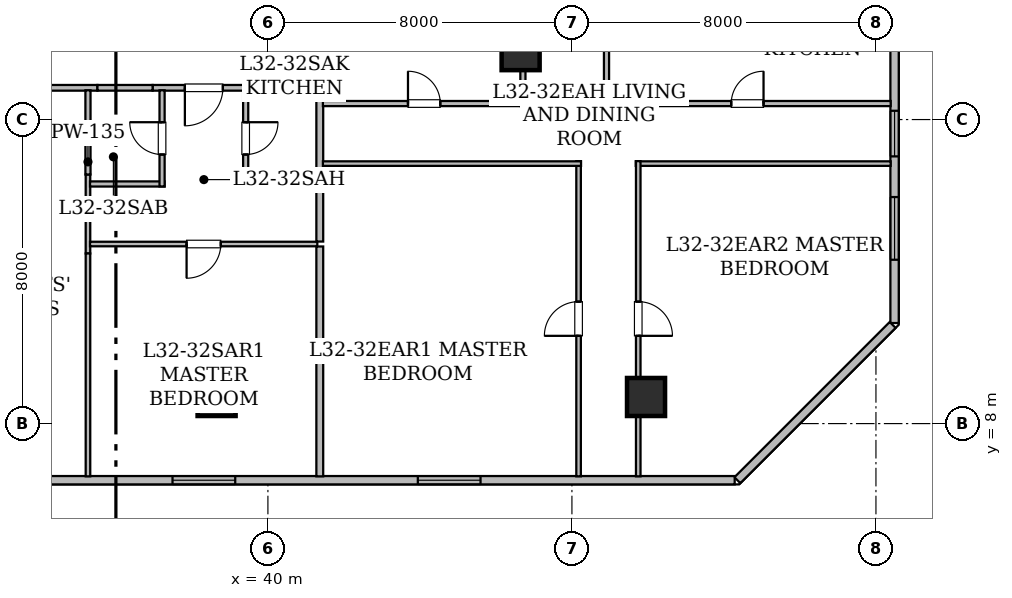
"""IFC4 building model, lengths in metres.
Left out: names, types, materials, properties, quantities, classifications, styles, units other than length and angle.
Written with IfcOpenShell. Run it as: python <this file> out.ifc"""

import sys

from ifc_helpers import new_model, si_unit, direction, frame, frame_2d, origin, origin_2d, place, context, subcontext, project, spatial, rectangle, hollow_rectangle, extrude, element, fill, save


model = new_model("IFC4")
c1 = context("Model", 3, precision=1e-05, world=origin(), true_north=direction((0.0, 1.0)))
c2 = subcontext(c1, "Body", "Model", "MODEL_VIEW")
j1 = project(units=[si_unit("LENGTHUNIT", "METRE"), si_unit("PLANEANGLEUNIT", "RADIAN")], contexts=[c1])
p1 = place(None, origin())
s1 = spatial("IfcSite", under=j1, at=p1, CompositionType="ELEMENT")
p2 = place(p1, origin())
s2 = spatial("IfcBuilding", under=s1, at=p2, CompositionType="ELEMENT")
p3 = place(p2, frame((0.0, 0.0, 127.45)))
s3 = spatial("IfcBuildingStorey", under=s2, at=p3, CompositionType="ELEMENT", Elevation=127.45)
for number, where, z_axis, x_axis in (
    (1, (38.65, 8.7, 0.0), (0.0, 0.0, 1.0), (1.0, 0.0, 0.0)),
    (2, (49.95, 8.7, 0.0), (0.0, 0.0, 1.0), (1.0, 0.0, 0.0)),
    (3, (46.65, 17.8, 0.0), (0.0, 0.0, 1.0), (1.0, 0.0, 0.0)),
):
    element("IfcColumn", number, at=place(p3, frame(where, z_axis=z_axis, x_axis=x_axis)), inside=s3, PredefinedType="COLUMN", context=c2, shape_type="SweptSolid", body=[
        extrude(hollow_rectangle(XDim=1.0, YDim=1.0, WallThickness=0.05, at=origin_2d()), origin(), (0.0, 0.0, 1.0), 3.65),
    ])
p4 = place(p3, frame((56.49, 24.707, 0.0), z_axis=(0.0, 0.0, 1.0), x_axis=(0.0, -1.0, 0.0)))
e4 = element("IfcWall", 4, at=p4, inside=s3, PredefinedType="STANDARD", context=c2, shape_type="SweptSolid", body=[
    extrude(rectangle(XDim=14.061, YDim=0.22, at=frame_2d((7.031, 0.0))), origin(), (0.0, 0.0, 1.0), 3.43),
])
p5 = place(p4, frame((8.476, 0.0, 0.8)))
e5 = element("IfcOpeningElement", 5, at=p5, cuts=e4, PredefinedType="OPENING", context=c2, shape_type="SweptSolid", body=[
    extrude(rectangle(XDim=1.2, YDim=1.5, at=frame_2d((0.6, 0.75))), frame((0.0, 0.12, 0.0), z_axis=(0.0, -1.0, 0.0), x_axis=(1.0, 0.0, 0.0)), (0.0, 0.0, 1.0), 0.24),
])
p6 = place(p4, frame((10.746, 0.0, 0.85)))
e6 = element("IfcOpeningElement", 6, at=p6, cuts=e4, PredefinedType="OPENING", context=c2, shape_type="SweptSolid", body=[
    extrude(rectangle(XDim=1.65, YDim=1.55, at=frame_2d((0.825, 0.775))), frame((0.0, 0.12, 0.0), z_axis=(0.0, -1.0, 0.0), x_axis=(1.0, 0.0, 0.0)), (0.0, 0.0, 1.0), 0.24),
])
p7 = place(p3, frame((56.44, 10.596, 0.0), z_axis=(0.0, 0.0, 1.0), x_axis=(-0.707106781187, -0.707106781187, 0.0)))
e7 = element("IfcWall", 7, at=p7, inside=s3, PredefinedType="STANDARD", context=c2, shape_type="SweptSolid", body=[
    extrude(rectangle(XDim=5.778, YDim=0.22, at=frame_2d((2.889, 0.0))), origin(), (0.0, 0.0, 1.0), 3.43),
])
p8 = place(p3, frame((52.283, 6.51, 0.0), z_axis=(0.0, 0.0, 1.0), x_axis=(-1.0, 0.0, 0.0)))
e8 = element("IfcWall", 8, at=p8, inside=s3, PredefinedType="STANDARD", context=c2, shape_type="SweptSolid", body=[
    extrude(rectangle(XDim=38.568, YDim=0.22, at=frame_2d((19.284, 0.0))), origin(), (0.0, 0.0, 1.0), 3.43),
])
p9 = place(p8, frame((20.408, 0.0, 0.85)))
e9 = element("IfcOpeningElement", 9, at=p9, cuts=e8, PredefinedType="OPENING", context=c2, shape_type="SweptSolid", body=[
    extrude(rectangle(XDim=1.65, YDim=1.55, at=frame_2d((0.825, 0.775))), frame((0.0, 0.12, 0.0), z_axis=(0.0, -1.0, 0.0), x_axis=(1.0, 0.0, 0.0)), (0.0, 0.0, 1.0), 0.24),
])
p10 = place(p8, frame((35.483, 0.0, 0.85)))
e10 = element("IfcOpeningElement", 10, at=p10, cuts=e8, PredefinedType="OPENING", context=c2, shape_type="SweptSolid", body=[
    extrude(rectangle(XDim=1.65, YDim=1.55, at=frame_2d((0.825, 0.775))), frame((0.0, 0.12, 0.0), z_axis=(0.0, -1.0, 0.0), x_axis=(1.0, 0.0, 0.0)), (0.0, 0.0, 1.0), 0.24),
])
p11 = place(p8, frame((25.888, 0.0, 0.85)))
e11 = element("IfcOpeningElement", 11, at=p11, cuts=e8, PredefinedType="OPENING", context=c2, shape_type="SweptSolid", body=[
    extrude(rectangle(XDim=1.65, YDim=1.55, at=frame_2d((0.825, 0.775))), frame((0.0, 0.12, 0.0), z_axis=(0.0, -1.0, 0.0), x_axis=(1.0, 0.0, 0.0)), (0.0, 0.0, 1.0), 0.24),
])
p12 = place(p8, frame((28.168, 0.0, 0.8)))
e12 = element("IfcOpeningElement", 12, at=p12, cuts=e8, PredefinedType="OPENING", context=c2, shape_type="SweptSolid", body=[
    extrude(rectangle(XDim=1.2, YDim=1.5, at=frame_2d((0.6, 0.75))), frame((0.0, 0.12, 0.0), z_axis=(0.0, -1.0, 0.0), x_axis=(1.0, 0.0, 0.0)), (0.0, 0.0, 1.0), 0.24),
])
p13 = place(p8, frame((31.371, 0.0, 0.85)))
e13 = element("IfcOpeningElement", 13, at=p13, cuts=e8, PredefinedType="OPENING", context=c2, shape_type="SweptSolid", body=[
    extrude(rectangle(XDim=1.65, YDim=1.55, at=frame_2d((0.825, 0.775))), frame((0.0, 0.12, 0.0), z_axis=(0.0, -1.0, 0.0), x_axis=(1.0, 0.0, 0.0)), (0.0, 0.0, 1.0), 0.24),
])
p14 = place(p8, frame((13.143, 0.0, 0.85)))
e14 = element("IfcOpeningElement", 14, at=p14, cuts=e8, PredefinedType="OPENING", context=c2, shape_type="SweptSolid", body=[
    extrude(rectangle(XDim=1.65, YDim=1.55, at=frame_2d((0.825, 0.775))), frame((0.0, 0.12, 0.0), z_axis=(0.0, -1.0, 0.0), x_axis=(1.0, 0.0, 0.0)), (0.0, 0.0, 1.0), 0.24),
])
p15 = place(p8, frame((6.688, 0.0, 0.85)))
e15 = element("IfcOpeningElement", 15, at=p15, cuts=e8, PredefinedType="OPENING", context=c2, shape_type="SweptSolid", body=[
    extrude(rectangle(XDim=1.65, YDim=1.55, at=frame_2d((0.825, 0.775))), frame((0.0, 0.12, 0.0), z_axis=(0.0, -1.0, 0.0), x_axis=(1.0, 0.0, 0.0)), (0.0, 0.0, 1.0), 0.24),
])
p16 = place(p3, frame((35.514, 16.835, 0.0), z_axis=(0.0, 0.0, 1.0), x_axis=(-1.0, 0.0, 0.0)))
e16 = element("IfcWall", 16, at=p16, inside=s3, PredefinedType="STANDARD", context=c2, shape_type="SweptSolid", body=[
    extrude(rectangle(XDim=8.614, YDim=0.15, at=frame_2d((4.307, 0.0))), origin(), (0.0, 0.0, 1.0), 2.647),
])
p17 = place(p16, frame((3.753, 0.0, 0.0)))
e17 = element("IfcOpeningElement", 17, at=p17, cuts=e16, PredefinedType="OPENING", context=c2, shape_type="SweptSolid", body=[
    extrude(rectangle(XDim=1.15, YDim=2.2, at=frame_2d((0.575, 1.1))), frame((0.0, 0.085, 0.0), z_axis=(0.0, -1.0, 0.0), x_axis=(1.0, 0.0, 0.0)), (0.0, 0.0, 1.0), 0.17),
])
p18 = place(p3, frame((39.664, 16.835, 0.0), z_axis=(0.0, 0.0, 1.0), x_axis=(-1.0, 0.0, 0.0)))
e18 = element("IfcWall", 18, at=p18, inside=s3, PredefinedType="STANDARD", context=c2, shape_type="SweptSolid", body=[
    extrude(rectangle(XDim=2.698, YDim=0.15, at=frame_2d((1.349, 0.0))), origin(), (0.0, 0.0, 1.0), 2.647),
])
p19 = place(p18, frame((0.849, 0.0, 0.0)))
e19 = element("IfcOpeningElement", 19, at=p19, cuts=e18, PredefinedType="OPENING", context=c2, shape_type="SweptSolid", body=[
    extrude(rectangle(XDim=1.0, YDim=2.15, at=frame_2d((0.5, 1.075))), frame((0.0, 0.085, 0.0), z_axis=(0.0, -1.0, 0.0), x_axis=(1.0, 0.0, 0.0)), (0.0, 0.0, 1.0), 0.17),
])
p20 = place(p3, frame((36.966, 16.835, 0.0), z_axis=(0.0, 0.0, 1.0), x_axis=(-1.0, 0.0, 0.0)))
e20 = element("IfcWall", 20, at=p20, inside=s3, PredefinedType="STANDARD", context=c2, shape_type="SweptSolid", body=[
    extrude(rectangle(XDim=1.452, YDim=0.15, at=frame_2d((0.726, 0.0))), origin(), (0.0, 0.0, 1.0), 3.43),
])
p21 = place(p3, frame((41.3, 16.835, 0.0), z_axis=(0.0, 0.0, 1.0), x_axis=(-1.0, 0.0, 0.0)))
e21 = element("IfcWall", 21, at=p21, inside=s3, PredefinedType="STANDARD", context=c2, shape_type="SweptSolid", body=[
    extrude(rectangle(XDim=1.636, YDim=0.15, at=frame_2d((0.818, 0.0))), origin(), (0.0, 0.0, 1.0), 3.43),
])
p22 = place(p3, frame((41.365, 20.05, 0.0), z_axis=(0.0, 0.0, 1.0), x_axis=(0.0, -1.0, 0.0)))
e22 = element("IfcWall", 22, at=p22, inside=s3, PredefinedType="STANDARD", context=c2, shape_type="SweptSolid", body=[
    extrude(rectangle(XDim=3.15, YDim=0.15, at=frame_2d((1.575, 0.0))), origin(), (0.0, 0.0, 1.0), 2.647),
])
p23 = place(p3, frame((35.265, 14.554, 0.0), z_axis=(0.0, 0.0, 1.0), x_axis=(0.0, -1.0, 0.0)))
e23 = element("IfcWall", 23, at=p23, inside=s3, PredefinedType="PARTITIONING", context=c2, shape_type="SweptSolid", body=[
    extrude(rectangle(XDim=2.078, YDim=0.12, at=frame_2d((1.039, 0.0))), origin(), (0.0, 0.0, 1.0), 3.43),
])
p24 = place(p3, frame((35.265, 16.77, 0.0), z_axis=(0.0, 0.0, 1.0), x_axis=(0.0, -1.0, 0.0)))
e24 = element("IfcWall", 24, at=p24, inside=s3, PredefinedType="PARTITIONING", context=c2, shape_type="SweptSolid", body=[
    extrude(rectangle(XDim=2.216, YDim=0.135, at=frame_2d((1.108, 0.0))), origin(), (0.0, 0.0, 1.0), 3.43),
])
p25 = place(p3, frame((35.265, 12.476, 0.0), z_axis=(0.0, 0.0, 1.0), x_axis=(0.0, -1.0, 0.0)))
e25 = element("IfcWall", 25, at=p25, inside=s3, PredefinedType="PARTITIONING", context=c2, shape_type="SweptSolid", body=[
    extrude(rectangle(XDim=5.864, YDim=0.12, at=frame_2d((2.932, 0.0))), origin(), (0.0, 0.0, 1.0), 2.876),
])
p26 = place(p3, frame((35.319, 14.305, 0.0), z_axis=(0.0, 0.0, 1.0), x_axis=(1.0, 0.0, 0.0)))
e26 = element("IfcWall", 26, at=p26, inside=s3, PredefinedType="PARTITIONING", context=c2, shape_type="SweptSolid", body=[
    extrude(rectangle(XDim=1.961, YDim=0.135, at=frame_2d((0.98, 0.0))), origin(), (0.0, 0.0, 1.0), 3.43),
])
p27 = place(p3, frame((37.215, 14.24, 0.0), z_axis=(0.0, 0.0, 1.0), x_axis=(0.0, 1.0, 0.0)))
e27 = element("IfcWall", 27, at=p27, inside=s3, PredefinedType="PARTITIONING", context=c2, shape_type="SweptSolid", body=[
    extrude(rectangle(XDim=2.53, YDim=0.135, at=frame_2d((1.265, 0.0))), origin(), (0.0, 0.0, 1.0), 3.43),
])
p28 = place(p27, frame((0.84, 0.0, 0.0)))
e28 = element("IfcOpeningElement", 28, at=p28, cuts=e27, PredefinedType="OPENING", context=c2, shape_type="SweptSolid", body=[
    extrude(rectangle(XDim=0.85, YDim=2.1, at=frame_2d((0.425, 1.05))), frame((0.0, 0.077, 0.0), z_axis=(0.0, -1.0, 0.0), x_axis=(1.0, 0.0, 0.0)), (0.0, 0.0, 1.0), 0.155),
])
p29 = place(p3, frame((39.415, 16.77, 0.0), z_axis=(0.0, 0.0, 1.0), x_axis=(0.0, -1.0, 0.0)))
e29 = element("IfcWall", 29, at=p29, inside=s3, PredefinedType="PARTITIONING", context=c2, shape_type="SweptSolid", body=[
    extrude(rectangle(XDim=2.53, YDim=0.135, at=frame_2d((1.265, 0.0))), origin(), (0.0, 0.0, 1.0), 2.647),
])
p30 = place(p29, frame((0.84, 0.0, 0.0)))
e30 = element("IfcOpeningElement", 30, at=p30, cuts=e29, PredefinedType="OPENING", context=c2, shape_type="SweptSolid", body=[
    extrude(rectangle(XDim=0.85, YDim=2.1, at=frame_2d((0.425, 1.05))), frame((0.0, 0.077, 0.0), z_axis=(0.0, -1.0, 0.0), x_axis=(1.0, 0.0, 0.0)), (0.0, 0.0, 1.0), 0.155),
])
p31 = place(p3, frame((39.35, 14.305, 0.0), z_axis=(0.0, 0.0, 1.0), x_axis=(1.0, 0.0, 0.0)))
e31 = element("IfcWall", 31, at=p31, inside=s3, PredefinedType="PARTITIONING", context=c2, shape_type="SweptSolid", body=[
    extrude(rectangle(XDim=1.95, YDim=0.135, at=frame_2d((0.975, 0.0))), origin(), (0.0, 0.0, 1.0), 3.43),
])
p32 = place(p3, frame((41.3, 12.725, 0.0), z_axis=(0.0, 0.0, 1.0), x_axis=(-1.0, 0.0, 0.0)))
e32 = element("IfcWall", 32, at=p32, inside=s3, PredefinedType="PARTITIONING", context=c2, shape_type="SweptSolid", body=[
    extrude(rectangle(XDim=5.981, YDim=0.12, at=frame_2d((2.99, 0.0))), origin(), (0.0, 0.0, 1.0), 2.647),
])
p33 = place(p32, frame((2.54, 0.0, 0.0)))
e33 = element("IfcOpeningElement", 33, at=p33, cuts=e32, PredefinedType="OPENING", context=c2, shape_type="SweptSolid", body=[
    extrude(rectangle(XDim=0.9, YDim=2.1, at=frame_2d((0.45, 1.05))), frame((0.0, 0.07, 0.0), z_axis=(0.0, -1.0, 0.0), x_axis=(1.0, 0.0, 0.0)), (0.0, 0.0, 1.0), 0.14),
])
p34 = place(p3, frame((41.365, 14.24, 0.0), z_axis=(0.0, 0.0, 1.0), x_axis=(0.0, -1.0, 0.0)))
e34 = element("IfcWall", 34, at=p34, inside=s3, PredefinedType="STANDARD", context=c2, shape_type="SweptSolid", body=[
    extrude(rectangle(XDim=1.45, YDim=0.18, at=frame_2d((0.725, 0.0))), origin(), (0.0, 0.0, 1.0), 3.43),
])
p35 = place(p3, frame((41.365, 16.67, 0.0), z_axis=(0.0, 0.0, 1.0), x_axis=(0.0, -1.0, 0.0)))
e35 = element("IfcWall", 35, at=p35, inside=s3, PredefinedType="STANDARD", context=c2, shape_type="SweptSolid", body=[
    extrude(rectangle(XDim=2.078, YDim=0.18, at=frame_2d((1.039, 0.0))), origin(), (0.0, 0.0, 1.0), 3.43),
])
p36 = place(p3, frame((41.365, 14.592, 0.0), z_axis=(0.0, 0.0, 1.0), x_axis=(0.0, -1.0, 0.0)))
e36 = element("IfcWall", 36, at=p36, inside=s3, PredefinedType="STANDARD", context=c2, shape_type="SweptSolid", body=[
    extrude(rectangle(XDim=0.222, YDim=0.18, at=frame_2d((0.111, 0.0))), origin(), (0.0, 0.0, 1.0), 3.43),
])
p37 = place(p3, frame((41.365, 12.66, 0.0), z_axis=(0.0, 0.0, 1.0), x_axis=(0.0, -1.0, 0.0)))
e37 = element("IfcWall", 37, at=p37, inside=s3, PredefinedType="STANDARD", context=c2, shape_type="SweptSolid", body=[
    extrude(rectangle(XDim=6.048, YDim=0.18, at=frame_2d((3.024, 0.0))), origin(), (0.0, 0.0, 1.0), 2.876),
])
p38 = place(p3, frame((41.447, 16.421, 0.0), z_axis=(0.0, 0.0, 1.0), x_axis=(1.0, 0.0, 0.0)))
e38 = element("IfcWall", 38, at=p38, inside=s3, PredefinedType="PARTITIONING", context=c2, shape_type="SweptSolid", body=[
    extrude(rectangle(XDim=5.328, YDim=0.135, at=frame_2d((2.664, 0.0))), origin(), (0.0, 0.0, 1.0), 3.43),
])
p39 = place(p38, frame((2.239, 0.0, 0.0)))
e39 = element("IfcOpeningElement", 39, at=p39, cuts=e38, PredefinedType="OPENING", context=c2, shape_type="SweptSolid", body=[
    extrude(rectangle(XDim=0.85, YDim=2.1, at=frame_2d((0.425, 1.05))), frame((0.0, 0.077, 0.0), z_axis=(0.0, -1.0, 0.0), x_axis=(1.0, 0.0, 0.0)), (0.0, 0.0, 1.0), 0.155),
])
for number, where, z_axis, x_axis in (
    (40, (46.71, 16.356, 0.0), (0.0, 0.0, 1.0), (0.0, 1.0, 0.0)),
    (41, (48.91, 19.918, 0.0), (0.0, 0.0, 1.0), (0.0, -1.0, 0.0)),
):
    element("IfcWall", number, at=place(p3, frame(where, z_axis=z_axis, x_axis=x_axis)), inside=s3, PredefinedType="PARTITIONING", context=c2, shape_type="SweptSolid", body=[
        extrude(rectangle(XDim=3.562, YDim=0.135, at=frame_2d((1.781, 0.0))), origin(), (0.0, 0.0, 1.0), 2.647),
    ])
p40 = place(p3, frame((48.845, 16.421, 0.0), z_axis=(0.0, 0.0, 1.0), x_axis=(1.0, 0.0, 0.0)))
e42 = element("IfcWall", 42, at=p40, inside=s3, PredefinedType="PARTITIONING", context=c2, shape_type="SweptSolid", body=[
    extrude(rectangle(XDim=7.543, YDim=0.135, at=frame_2d((3.771, 0.0))), origin(), (0.0, 0.0, 1.0), 2.876),
])
p41 = place(p40, frame((3.347, 0.0, 0.0)))
e43 = element("IfcOpeningElement", 43, at=p41, cuts=e42, PredefinedType="OPENING", context=c2, shape_type="SweptSolid", body=[
    extrude(rectangle(XDim=0.85, YDim=2.1, at=frame_2d((0.425, 1.05))), frame((0.0, 0.077, 0.0), z_axis=(0.0, -1.0, 0.0), x_axis=(1.0, 0.0, 0.0)), (0.0, 0.0, 1.0), 0.155),
])
p42 = place(p3, frame((48.175, 6.612, 0.0), z_axis=(0.0, 0.0, 1.0), x_axis=(0.0, 1.0, 0.0)))
e44 = element("IfcWall", 44, at=p42, inside=s3, PredefinedType="PARTITIONING", context=c2, shape_type="SweptSolid", body=[
    extrude(rectangle(XDim=8.294, YDim=0.12, at=frame_2d((4.147, 0.0))), origin(), (0.0, 0.0, 1.0), 2.647),
])
p43 = place(p42, frame((3.697, 0.0, 0.0)))
e45 = element("IfcOpeningElement", 45, at=p43, cuts=e44, PredefinedType="OPENING", context=c2, shape_type="SweptSolid", body=[
    extrude(rectangle(XDim=0.9, YDim=2.1, at=frame_2d((0.45, 1.05))), frame((0.0, 0.07, 0.0), z_axis=(0.0, -1.0, 0.0), x_axis=(1.0, 0.0, 0.0)), (0.0, 0.0, 1.0), 0.14),
])
p44 = place(p3, frame((48.24, 14.841, 0.0), z_axis=(0.0, 0.0, 1.0), x_axis=(-1.0, 0.0, 0.0)))
e46 = element("IfcWall", 46, at=p44, inside=s3, PredefinedType="PARTITIONING", context=c2, shape_type="SweptSolid", body=[
    extrude(rectangle(XDim=6.793, YDim=0.12, at=frame_2d((3.396, 0.0))), origin(), (0.0, 0.0, 1.0), 2.647),
])
p45 = place(p3, frame((56.388, 14.841, 0.0), z_axis=(0.0, 0.0, 1.0), x_axis=(-1.0, 0.0, 0.0)))
e47 = element("IfcWall", 47, at=p45, inside=s3, PredefinedType="PARTITIONING", context=c2, shape_type="SweptSolid", body=[
    extrude(rectangle(XDim=6.708, YDim=0.12, at=frame_2d((3.354, 0.0))), origin(), (0.0, 0.0, 1.0), 2.876),
])
p46 = place(p3, frame((49.745, 14.906, 0.0), z_axis=(0.0, 0.0, 1.0), x_axis=(0.0, -1.0, 0.0)))
e48 = element("IfcWall", 48, at=p46, inside=s3, PredefinedType="PARTITIONING", context=c2, shape_type="SweptSolid", body=[
    extrude(rectangle(XDim=8.294, YDim=0.12, at=frame_2d((4.147, 0.0))), origin(), (0.0, 0.0, 1.0), 2.647),
])
p47 = place(p46, frame((3.697, 0.0, 0.0)))
e49 = element("IfcOpeningElement", 49, at=p47, cuts=e48, PredefinedType="OPENING", context=c2, shape_type="SweptSolid", body=[
    extrude(rectangle(XDim=0.9, YDim=2.1, at=frame_2d((0.45, 1.05))), frame((0.0, 0.07, 0.0), z_axis=(0.0, -1.0, 0.0), x_axis=(1.0, 0.0, 0.0)), (0.0, 0.0, 1.0), 0.14),
])
p48 = place(p14, origin())
e50 = element("IfcWindow", 50, at=p48, inside=s3, PartitioningType="SINGLE_PANEL", PredefinedType="WINDOW", context=c2, shape_type="SweptSolid", body=[
    extrude(rectangle(XDim=1.65, YDim=1.55, at=frame_2d((0.825, 0.775))), frame((0.0, 0.03, 0.0), z_axis=(0.0, -1.0, 0.0), x_axis=(1.0, 0.0, 0.0)), (0.0, 0.0, 1.0), 0.06),
])
fill(e14, e50)
p49 = place(p5, origin())
e51 = element("IfcWindow", 51, at=p49, inside=s3, PartitioningType="SINGLE_PANEL", PredefinedType="WINDOW", context=c2, shape_type="SweptSolid", body=[
    extrude(rectangle(XDim=1.2, YDim=1.5, at=frame_2d((0.6, 0.75))), frame((0.0, 0.03, 0.0), z_axis=(0.0, -1.0, 0.0), x_axis=(1.0, 0.0, 0.0)), (0.0, 0.0, 1.0), 0.06),
])
fill(e5, e51)
p50 = place(p15, origin())
e52 = element("IfcWindow", 52, at=p50, inside=s3, PartitioningType="SINGLE_PANEL", PredefinedType="WINDOW", context=c2, shape_type="SweptSolid", body=[
    extrude(rectangle(XDim=1.65, YDim=1.55, at=frame_2d((0.825, 0.775))), frame((0.0, 0.03, 0.0), z_axis=(0.0, -1.0, 0.0), x_axis=(1.0, 0.0, 0.0)), (0.0, 0.0, 1.0), 0.06),
])
fill(e15, e52)
p51 = place(p6, origin())
e53 = element("IfcWindow", 53, at=p51, inside=s3, PartitioningType="SINGLE_PANEL", PredefinedType="WINDOW", context=c2, shape_type="SweptSolid", body=[
    extrude(rectangle(XDim=1.65, YDim=1.55, at=frame_2d((0.825, 0.775))), frame((0.0, 0.03, 0.0), z_axis=(0.0, -1.0, 0.0), x_axis=(1.0, 0.0, 0.0)), (0.0, 0.0, 1.0), 0.06),
])
fill(e6, e53)
p52 = place(p19, origin())
e54 = element("IfcDoor", 54, at=p52, inside=s3, OperationType="SINGLE_SWING_RIGHT", PredefinedType="DOOR", context=c2, shape_type="SweptSolid", body=[
    extrude(rectangle(XDim=1.0, YDim=2.15, at=frame_2d((0.5, 1.075))), frame((0.0, 0.025, 0.0), z_axis=(0.0, -1.0, 0.0), x_axis=(1.0, 0.0, 0.0)), (0.0, 0.0, 1.0), 0.05),
])
fill(e19, e54)
p53 = place(p28, origin())
e55 = element("IfcDoor", 55, at=p53, inside=s3, OperationType="SINGLE_SWING_RIGHT", PredefinedType="DOOR", context=c2, shape_type="SweptSolid", body=[
    extrude(rectangle(XDim=0.85, YDim=2.1, at=frame_2d((0.425, 1.05))), frame((0.0, 0.025, 0.0), z_axis=(0.0, -1.0, 0.0), x_axis=(1.0, 0.0, 0.0)), (0.0, 0.0, 1.0), 0.05),
])
fill(e28, e55)
p54 = place(p30, origin())
e56 = element("IfcDoor", 56, at=p54, inside=s3, OperationType="SINGLE_SWING_LEFT", PredefinedType="DOOR", context=c2, shape_type="SweptSolid", body=[
    extrude(rectangle(XDim=0.85, YDim=2.1, at=frame_2d((0.425, 1.05))), frame((0.0, 0.025, 0.0), z_axis=(0.0, -1.0, 0.0), x_axis=(1.0, 0.0, 0.0)), (0.0, 0.0, 1.0), 0.05),
])
fill(e30, e56)
p55 = place(p33, origin())
e57 = element("IfcDoor", 57, at=p55, inside=s3, OperationType="SINGLE_SWING_RIGHT", PredefinedType="DOOR", context=c2, shape_type="SweptSolid", body=[
    extrude(rectangle(XDim=0.9, YDim=2.1, at=frame_2d((0.45, 1.05))), frame((0.0, 0.025, 0.0), z_axis=(0.0, -1.0, 0.0), x_axis=(1.0, 0.0, 0.0)), (0.0, 0.0, 1.0), 0.05),
])
fill(e33, e57)
p56 = place(p39, origin())
e58 = element("IfcDoor", 58, at=p56, inside=s3, OperationType="SINGLE_SWING_LEFT", PredefinedType="DOOR", context=c2, shape_type="SweptSolid", body=[
    extrude(rectangle(XDim=0.85, YDim=2.1, at=frame_2d((0.425, 1.05))), frame((0.0, 0.025, 0.0), z_axis=(0.0, -1.0, 0.0), x_axis=(1.0, 0.0, 0.0)), (0.0, 0.0, 1.0), 0.05),
])
fill(e39, e58)
p57 = place(p41, origin())
e59 = element("IfcDoor", 59, at=p57, inside=s3, OperationType="SINGLE_SWING_RIGHT", PredefinedType="DOOR", context=c2, shape_type="SweptSolid", body=[
    extrude(rectangle(XDim=0.85, YDim=2.1, at=frame_2d((0.425, 1.05))), frame((0.0, 0.025, 0.0), z_axis=(0.0, -1.0, 0.0), x_axis=(1.0, 0.0, 0.0)), (0.0, 0.0, 1.0), 0.05),
])
fill(e43, e59)
p58 = place(p43, origin())
e60 = element("IfcDoor", 60, at=p58, inside=s3, OperationType="SINGLE_SWING_LEFT", PredefinedType="DOOR", context=c2, shape_type="SweptSolid", body=[
    extrude(rectangle(XDim=0.9, YDim=2.1, at=frame_2d((0.45, 1.05))), frame((0.0, 0.025, 0.0), z_axis=(0.0, -1.0, 0.0), x_axis=(1.0, 0.0, 0.0)), (0.0, 0.0, 1.0), 0.05),
])
fill(e45, e60)
p59 = place(p47, origin())
e61 = element("IfcDoor", 61, at=p59, inside=s3, OperationType="SINGLE_SWING_RIGHT", PredefinedType="DOOR", context=c2, shape_type="SweptSolid", body=[
    extrude(rectangle(XDim=0.9, YDim=2.1, at=frame_2d((0.45, 1.05))), frame((0.0, 0.025, 0.0), z_axis=(0.0, -1.0, 0.0), x_axis=(1.0, 0.0, 0.0)), (0.0, 0.0, 1.0), 0.05),
])
fill(e49, e61)
save(model, sys.argv[1])
